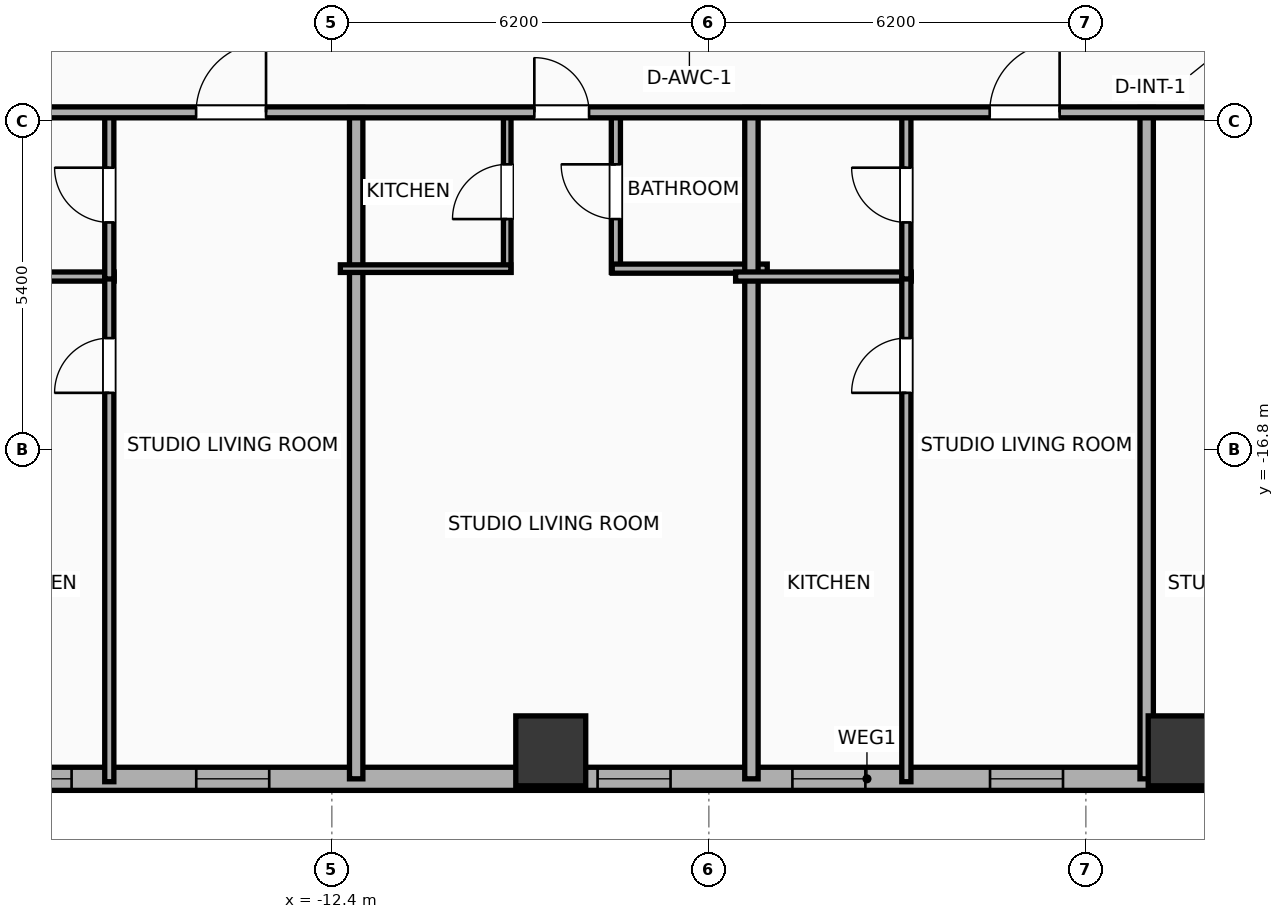
"""IFC4 building model, lengths in metres.
Left out: names, types, materials, properties, quantities, classifications, styles, units other than length and angle.
Written with IfcOpenShell. Run it as: python <this file> out.ifc"""

import sys

from ifc_helpers import new_model, si_unit, direction, frame, frame_2d, origin, origin_2d, place, context, subcontext, project, spatial, rectangle, hollow_rectangle, extrude, element, fill, save


model = new_model("IFC4")
c1 = context("Model", 3, precision=1e-05, world=origin(), true_north=direction((0.0, 1.0)))
c2 = subcontext(c1, "Body", "Model", "MODEL_VIEW")
j1 = project(units=[si_unit("LENGTHUNIT", "METRE"), si_unit("PLANEANGLEUNIT", "RADIAN")], contexts=[c1])
p1 = place(None, origin())
s1 = spatial("IfcSite", under=j1, at=p1, CompositionType="ELEMENT")
p2 = place(p1, origin())
s2 = spatial("IfcBuilding", under=s1, at=p2, CompositionType="ELEMENT")
p3 = place(p2, frame((0.0, 0.0, 76.7)))
s3 = spatial("IfcBuildingStorey", under=s2, at=p3, CompositionType="ELEMENT", Elevation=76.7)
for number, where, z_axis, x_axis in (
    (1, (-8.8, -21.75, 0.0), (0.0, 0.0, 1.0), (1.0, 0.0, 0.0)),
    (2, (1.6, -21.75, 0.0), (0.0, 0.0, 1.0), (1.0, 0.0, 0.0)),
):
    element("IfcColumn", number, at=place(p3, frame(where, z_axis=z_axis, x_axis=x_axis)), inside=s3, PredefinedType="COLUMN", context=c2, shape_type="SweptSolid", body=[
        extrude(hollow_rectangle(XDim=1.15, YDim=1.15, WallThickness=0.04, at=origin_2d()), origin(), (0.0, 0.0, 1.0), 3.9),
    ])
p4 = place(p3, frame((22.381, -22.21, 0.0), z_axis=(0.0, 0.0, 1.0), x_axis=(-1.0, 0.0, 0.0)))
e3 = element("IfcWall", 3, at=p4, inside=s3, PredefinedType="ELEMENTEDWALL", context=c2, shape_type="SweptSolid", body=[
    extrude(rectangle(XDim=51.963, YDim=0.38, at=frame_2d((25.981, 0.0))), origin(), (0.0, 0.0, 1.0), 3.6),
])
p5 = place(p4, frame((5.81, 0.0, 0.75)))
e4 = element("IfcOpeningElement", 4, at=p5, cuts=e3, PredefinedType="OPENING", context=c2, shape_type="SweptSolid", body=[
    extrude(rectangle(XDim=2.4, YDim=2.1, at=frame_2d((1.2, 1.05))), frame((0.0, 0.2, 0.0), z_axis=(0.0, -1.0, 0.0), x_axis=(1.0, 0.0, 0.0)), (0.0, 0.0, 1.0), 0.4),
])
p6 = place(p4, frame((49.106, 0.0, 0.75)))
e5 = element("IfcOpeningElement", 5, at=p6, cuts=e3, PredefinedType="OPENING", context=c2, shape_type="SweptSolid", body=[
    extrude(rectangle(XDim=1.2, YDim=2.05, at=frame_2d((0.6, 1.025))), frame((0.0, 0.2, 0.0), z_axis=(0.0, -1.0, 0.0), x_axis=(1.0, 0.0, 0.0)), (0.0, 0.0, 1.0), 0.4),
])
p7 = place(p4, frame((45.716, 0.0, 0.75)))
e6 = element("IfcOpeningElement", 6, at=p7, cuts=e3, PredefinedType="OPENING", context=c2, shape_type="SweptSolid", body=[
    extrude(rectangle(XDim=1.2, YDim=2.05, at=frame_2d((0.6, 1.025))), frame((0.0, 0.2, 0.0), z_axis=(0.0, -1.0, 0.0), x_axis=(1.0, 0.0, 0.0)), (0.0, 0.0, 1.0), 0.4),
])
p8 = place(p4, frame((42.346, 0.0, 0.75)))
e7 = element("IfcOpeningElement", 7, at=p8, cuts=e3, PredefinedType="OPENING", context=c2, shape_type="SweptSolid", body=[
    extrude(rectangle(XDim=1.2, YDim=2.05, at=frame_2d((0.6, 1.025))), frame((0.0, 0.2, 0.0), z_axis=(0.0, -1.0, 0.0), x_axis=(1.0, 0.0, 0.0)), (0.0, 0.0, 1.0), 0.4),
])
p9 = place(p4, frame((35.811, 0.0, 0.75)))
e8 = element("IfcOpeningElement", 8, at=p9, cuts=e3, PredefinedType="OPENING", context=c2, shape_type="SweptSolid", body=[
    extrude(rectangle(XDim=1.2, YDim=2.05, at=frame_2d((0.6, 1.025))), frame((0.0, 0.2, 0.0), z_axis=(0.0, -1.0, 0.0), x_axis=(1.0, 0.0, 0.0)), (0.0, 0.0, 1.0), 0.4),
])
p10 = place(p4, frame((39.061, 0.0, 0.75)))
e9 = element("IfcOpeningElement", 9, at=p10, cuts=e3, PredefinedType="OPENING", context=c2, shape_type="SweptSolid", body=[
    extrude(rectangle(XDim=1.2, YDim=2.05, at=frame_2d((0.6, 1.025))), frame((0.0, 0.2, 0.0), z_axis=(0.0, -1.0, 0.0), x_axis=(1.0, 0.0, 0.0)), (0.0, 0.0, 1.0), 0.4),
])
p11 = place(p4, frame((29.211, 0.0, 0.75)))
e10 = element("IfcOpeningElement", 10, at=p11, cuts=e3, PredefinedType="OPENING", context=c2, shape_type="SweptSolid", body=[
    extrude(rectangle(XDim=1.2, YDim=2.05, at=frame_2d((0.6, 1.025))), frame((0.0, 0.2, 0.0), z_axis=(0.0, -1.0, 0.0), x_axis=(1.0, 0.0, 0.0)), (0.0, 0.0, 1.0), 0.4),
])
p12 = place(p4, frame((22.757, 0.0, 0.75)))
e11 = element("IfcOpeningElement", 11, at=p12, cuts=e3, PredefinedType="OPENING", context=c2, shape_type="SweptSolid", body=[
    extrude(rectangle(XDim=1.2, YDim=2.05, at=frame_2d((0.6, 1.025))), frame((0.0, 0.2, 0.0), z_axis=(0.0, -1.0, 0.0), x_axis=(1.0, 0.0, 0.0)), (0.0, 0.0, 1.0), 0.4),
])
p13 = place(p4, frame((26.007, 0.0, 0.75)))
e12 = element("IfcOpeningElement", 12, at=p13, cuts=e3, PredefinedType="OPENING", context=c2, shape_type="SweptSolid", body=[
    extrude(rectangle(XDim=1.2, YDim=2.05, at=frame_2d((0.6, 1.025))), frame((0.0, 0.2, 0.0), z_axis=(0.0, -1.0, 0.0), x_axis=(1.0, 0.0, 0.0)), (0.0, 0.0, 1.0), 0.4),
])
p14 = place(p4, frame((18.697, 0.0, 0.75)))
e13 = element("IfcOpeningElement", 13, at=p14, cuts=e3, PredefinedType="OPENING", context=c2, shape_type="SweptSolid", body=[
    extrude(rectangle(XDim=1.2, YDim=2.05, at=frame_2d((0.6, 1.025))), frame((0.0, 0.2, 0.0), z_axis=(0.0, -1.0, 0.0), x_axis=(1.0, 0.0, 0.0)), (0.0, 0.0, 1.0), 0.4),
])
p15 = place(p4, frame((15.447, 0.0, 0.75)))
e14 = element("IfcOpeningElement", 14, at=p15, cuts=e3, PredefinedType="OPENING", context=c2, shape_type="SweptSolid", body=[
    extrude(rectangle(XDim=1.2, YDim=2.05, at=frame_2d((0.6, 1.025))), frame((0.0, 0.2, 0.0), z_axis=(0.0, -1.0, 0.0), x_axis=(1.0, 0.0, 0.0)), (0.0, 0.0, 1.0), 0.4),
])
p16 = place(p4, frame((11.162, 0.0, 0.75)))
e15 = element("IfcOpeningElement", 15, at=p16, cuts=e3, PredefinedType="OPENING", context=c2, shape_type="SweptSolid", body=[
    extrude(rectangle(XDim=1.2, YDim=2.05, at=frame_2d((0.6, 1.025))), frame((0.0, 0.2, 0.0), z_axis=(0.0, -1.0, 0.0), x_axis=(1.0, 0.0, 0.0)), (0.0, 0.0, 1.0), 0.4),
])
p17 = place(p4, frame((2.974, 0.0, 0.75)))
e16 = element("IfcOpeningElement", 16, at=p17, cuts=e3, PredefinedType="OPENING", context=c2, shape_type="SweptSolid", body=[
    extrude(rectangle(XDim=1.2, YDim=2.05, at=frame_2d((0.6, 1.025))), frame((0.0, 0.2, 0.0), z_axis=(0.0, -1.0, 0.0), x_axis=(1.0, 0.0, 0.0)), (0.0, 0.0, 1.0), 0.4),
])
p18 = place(p4, frame((0.927, 0.0, 0.75)))
e17 = element("IfcOpeningElement", 17, at=p18, cuts=e3, PredefinedType="OPENING", context=c2, shape_type="SweptSolid", body=[
    extrude(rectangle(XDim=1.2, YDim=2.05, at=frame_2d((0.6, 1.025))), frame((0.0, 0.2, 0.0), z_axis=(0.0, -1.0, 0.0), x_axis=(1.0, 0.0, 0.0)), (0.0, 0.0, 1.0), 0.4),
])
p19 = place(p3, frame((-18.76, -13.95, 0.0), z_axis=(0.0, 0.0, 1.0), x_axis=(1.0, 0.0, 0.0)))
e18 = element("IfcWall", 18, at=p19, inside=s3, PredefinedType="PLUMBINGWALL", context=c2, shape_type="SweptSolid", body=[
    extrude(rectangle(XDim=2.78, YDim=0.15, at=frame_2d((1.39, 0.0))), origin(), (0.0, 0.0, 1.0), 3.6),
])
p20 = place(p3, frame((-16.06, -22.258, 0.0), z_axis=(0.0, 0.0, 1.0), x_axis=(0.0, 1.0, 0.0)))
e19 = element("IfcWall", 19, at=p20, inside=s3, PredefinedType="PLUMBINGWALL", context=c2, shape_type="SweptSolid", body=[
    extrude(rectangle(XDim=8.348, YDim=0.15, at=frame_2d((4.174, 0.0))), origin(), (0.0, 0.0, 1.0), 3.6),
])
p21 = place(p20, frame((6.395, 0.0, 0.0)))
e20 = element("IfcOpeningElement", 20, at=p21, cuts=e19, PredefinedType="OPENING", context=c2, shape_type="SweptSolid", body=[
    extrude(rectangle(XDim=0.9, YDim=2.05, at=frame_2d((0.45, 1.025))), frame((0.0, 0.085, 0.0), z_axis=(0.0, -1.0, 0.0), x_axis=(1.0, 0.0, 0.0)), (0.0, 0.0, 1.0), 0.17),
])
p22 = place(p3, frame((-16.06, -13.99, 0.0), z_axis=(0.0, 0.0, 1.0), x_axis=(0.0, 1.0, 0.0)))
e21 = element("IfcWall", 21, at=p22, inside=s3, PredefinedType="PLUMBINGWALL", context=c2, shape_type="SweptSolid", body=[
    extrude(rectangle(XDim=2.76, YDim=0.15, at=frame_2d((1.38, 0.0))), origin(), (0.0, 0.0, 1.0), 3.6),
])
p23 = place(p22, frame((0.93, 0.0, 0.0)))
e22 = element("IfcOpeningElement", 22, at=p23, cuts=e21, PredefinedType="OPENING", context=c2, shape_type="SweptSolid", body=[
    extrude(rectangle(XDim=0.9, YDim=2.05, at=frame_2d((0.45, 1.025))), frame((0.0, 0.085, 0.0), z_axis=(0.0, -1.0, 0.0), x_axis=(1.0, 0.0, 0.0)), (0.0, 0.0, 1.0), 0.17),
])
p24 = place(p3, frame((-12.0, -22.21, 0.0), z_axis=(0.0, 0.0, 1.0), x_axis=(0.0, 1.0, 0.0)))
e23 = element("IfcWall", 23, at=p24, inside=s3, PredefinedType="PARTITIONING", context=c2, shape_type="SweptSolid", body=[
    extrude(rectangle(XDim=11.04, YDim=0.22, at=frame_2d((5.52, 0.0))), origin(), (0.0, 0.0, 1.0), 3.6),
])
p25 = place(p3, frame((-9.516, -13.88, 0.0), z_axis=(0.0, 0.0, 1.0), x_axis=(0.0, 1.0, 0.0)))
e24 = element("IfcWall", 24, at=p25, inside=s3, PredefinedType="PARTITIONING", context=c2, shape_type="SweptSolid", body=[
    extrude(rectangle(XDim=2.65, YDim=0.125, at=frame_2d((1.325, 0.0))), origin(), (0.0, 0.0, 1.0), 3.6),
])
p26 = place(p25, frame((0.875, 0.0, 0.0)))
e25 = element("IfcOpeningElement", 25, at=p26, cuts=e24, PredefinedType="OPENING", context=c2, shape_type="SweptSolid", body=[
    extrude(rectangle(XDim=0.9, YDim=2.05, at=frame_2d((0.45, 1.025))), frame((0.0, 0.073, 0.0), z_axis=(0.0, -1.0, 0.0), x_axis=(1.0, 0.0, 0.0)), (0.0, 0.0, 1.0), 0.145),
])
p27 = place(p3, frame((-7.729, -13.88, 0.0), z_axis=(0.0, 0.0, 1.0), x_axis=(0.0, 1.0, 0.0)))
e26 = element("IfcWall", 26, at=p27, inside=s3, PredefinedType="PLUMBINGWALL", context=c2, shape_type="SweptSolid", body=[
    extrude(rectangle(XDim=2.65, YDim=0.15, at=frame_2d((1.325, 0.0))), origin(), (0.0, 0.0, 1.0), 3.6),
])
p28 = place(p27, frame((0.875, 0.0, 0.0)))
e27 = element("IfcOpeningElement", 27, at=p28, cuts=e26, PredefinedType="OPENING", context=c2, shape_type="SweptSolid", body=[
    extrude(rectangle(XDim=0.9, YDim=2.05, at=frame_2d((0.45, 1.025))), frame((0.0, 0.085, 0.0), z_axis=(0.0, -1.0, 0.0), x_axis=(1.0, 0.0, 0.0)), (0.0, 0.0, 1.0), 0.17),
])
p29 = place(p3, frame((-12.26, -13.82, 0.0), z_axis=(0.0, 0.0, 1.0), x_axis=(1.0, 0.0, 0.0)))
e28 = element("IfcWall", 28, at=p29, inside=s3, PredefinedType="PARTITIONING", context=c2, shape_type="SweptSolid", body=[
    extrude(rectangle(XDim=2.804, YDim=0.125, at=frame_2d((1.402, 0.0))), origin(), (0.0, 0.0, 1.0), 3.6),
])
p30 = place(p3, frame((-7.789, -13.82, 0.0), z_axis=(0.0, 0.0, 1.0), x_axis=(1.0, 0.0, 0.0)))
e29 = element("IfcWall", 29, at=p30, inside=s3, PredefinedType="PLUMBINGWALL", context=c2, shape_type="SweptSolid", body=[
    extrude(rectangle(XDim=2.549, YDim=0.15, at=frame_2d((1.274, 0.0))), origin(), (0.0, 0.0, 1.0), 3.6),
])
p31 = place(p3, frame((-5.5, -22.21, 0.0), z_axis=(0.0, 0.0, 1.0), x_axis=(0.0, 1.0, 0.0)))
e30 = element("IfcWall", 30, at=p31, inside=s3, PredefinedType="PARTITIONING", context=c2, shape_type="SweptSolid", body=[
    extrude(rectangle(XDim=11.04, YDim=0.22, at=frame_2d((5.52, 0.0))), origin(), (0.0, 0.0, 1.0), 3.6),
])
p32 = place(p3, frame((-5.76, -13.95, 0.0), z_axis=(0.0, 0.0, 1.0), x_axis=(1.0, 0.0, 0.0)))
e31 = element("IfcWall", 31, at=p32, inside=s3, PredefinedType="PLUMBINGWALL", context=c2, shape_type="SweptSolid", body=[
    extrude(rectangle(XDim=2.888, YDim=0.15, at=frame_2d((1.444, 0.0))), origin(), (0.0, 0.0, 1.0), 3.6),
])
p33 = place(p3, frame((-2.952, -22.258, 0.0), z_axis=(0.0, 0.0, 1.0), x_axis=(0.0, 1.0, 0.0)))
e32 = element("IfcWall", 32, at=p33, inside=s3, PredefinedType="PLUMBINGWALL", context=c2, shape_type="SweptSolid", body=[
    extrude(rectangle(XDim=8.348, YDim=0.15, at=frame_2d((4.174, 0.0))), origin(), (0.0, 0.0, 1.0), 3.6),
])
p34 = place(p33, frame((6.395, 0.0, 0.0)))
e33 = element("IfcOpeningElement", 33, at=p34, cuts=e32, PredefinedType="OPENING", context=c2, shape_type="SweptSolid", body=[
    extrude(rectangle(XDim=0.9, YDim=2.05, at=frame_2d((0.45, 1.025))), frame((0.0, 0.085, 0.0), z_axis=(0.0, -1.0, 0.0), x_axis=(1.0, 0.0, 0.0)), (0.0, 0.0, 1.0), 0.17),
])
p35 = place(p3, frame((-2.952, -13.99, 0.0), z_axis=(0.0, 0.0, 1.0), x_axis=(0.0, 1.0, 0.0)))
e34 = element("IfcWall", 34, at=p35, inside=s3, PredefinedType="PLUMBINGWALL", context=c2, shape_type="SweptSolid", body=[
    extrude(rectangle(XDim=2.76, YDim=0.15, at=frame_2d((1.38, 0.0))), origin(), (0.0, 0.0, 1.0), 3.6),
])
p36 = place(p35, frame((0.93, 0.0, 0.0)))
e35 = element("IfcOpeningElement", 35, at=p36, cuts=e34, PredefinedType="OPENING", context=c2, shape_type="SweptSolid", body=[
    extrude(rectangle(XDim=0.9, YDim=2.05, at=frame_2d((0.45, 1.025))), frame((0.0, 0.085, 0.0), z_axis=(0.0, -1.0, 0.0), x_axis=(1.0, 0.0, 0.0)), (0.0, 0.0, 1.0), 0.17),
])
p37 = place(p3, frame((1.0, -22.21, 0.0), z_axis=(0.0, 0.0, 1.0), x_axis=(0.0, 1.0, 0.0)))
e36 = element("IfcWall", 36, at=p37, inside=s3, PredefinedType="PARTITIONING", context=c2, shape_type="SweptSolid", body=[
    extrude(rectangle(XDim=11.04, YDim=0.22, at=frame_2d((5.52, 0.0))), origin(), (0.0, 0.0, 1.0), 3.6),
])
p38 = place(p3, frame((-33.41, -11.25, 0.0), z_axis=(0.0, 0.0, 1.0), x_axis=(1.0, 0.0, 0.0)))
e37 = element("IfcWall", 37, at=p38, inside=s3, PredefinedType="PARTITIONING", context=c2, shape_type="SweptSolid", body=[
    extrude(rectangle(XDim=59.62, YDim=0.18, at=frame_2d((29.81, 0.0))), origin(), (0.0, 0.0, 1.0), 3.6),
])
p39 = place(p38, frame((3.282, 0.0, 0.0)))
e38 = element("IfcOpeningElement", 38, at=p39, cuts=e37, PredefinedType="OPENING", context=c2, shape_type="SweptSolid", body=[
    extrude(rectangle(XDim=1.15, YDim=2.05, at=frame_2d((0.575, 1.025))), frame((0.0, 0.1, 0.0), z_axis=(0.0, -1.0, 0.0), x_axis=(1.0, 0.0, 0.0)), (0.0, 0.0, 1.0), 0.2),
])
p40 = place(p38, frame((10.771, 0.0, 0.0)))
e39 = element("IfcOpeningElement", 39, at=p40, cuts=e37, PredefinedType="OPENING", context=c2, shape_type="SweptSolid", body=[
    extrude(rectangle(XDim=1.15, YDim=2.05, at=frame_2d((0.575, 1.025))), frame((0.0, 0.1, 0.0), z_axis=(0.0, -1.0, 0.0), x_axis=(1.0, 0.0, 0.0)), (0.0, 0.0, 1.0), 0.2),
])
p41 = place(p38, frame((18.778, 0.0, 0.0)))
e40 = element("IfcOpeningElement", 40, at=p41, cuts=e37, PredefinedType="OPENING", context=c2, shape_type="SweptSolid", body=[
    extrude(rectangle(XDim=1.15, YDim=2.05, at=frame_2d((0.575, 1.025))), frame((0.0, 0.1, 0.0), z_axis=(0.0, -1.0, 0.0), x_axis=(1.0, 0.0, 0.0)), (0.0, 0.0, 1.0), 0.2),
])
p42 = place(p38, frame((24.34, 0.0, 0.0)))
e41 = element("IfcOpeningElement", 41, at=p42, cuts=e37, PredefinedType="OPENING", context=c2, shape_type="SweptSolid", body=[
    extrude(rectangle(XDim=0.9, YDim=2.05, at=frame_2d((0.45, 1.025))), frame((0.0, 0.1, 0.0), z_axis=(0.0, -1.0, 0.0), x_axis=(1.0, 0.0, 0.0)), (0.0, 0.0, 1.0), 0.2),
])
p43 = place(p38, frame((31.829, 0.0, 0.0)))
e42 = element("IfcOpeningElement", 42, at=p43, cuts=e37, PredefinedType="OPENING", context=c2, shape_type="SweptSolid", body=[
    extrude(rectangle(XDim=1.15, YDim=2.05, at=frame_2d((0.575, 1.025))), frame((0.0, 0.1, 0.0), z_axis=(0.0, -1.0, 0.0), x_axis=(1.0, 0.0, 0.0)), (0.0, 0.0, 1.0), 0.2),
])
p44 = place(p38, frame((35.948, 0.0, 0.0)))
e43 = element("IfcOpeningElement", 43, at=p44, cuts=e37, PredefinedType="OPENING", context=c2, shape_type="SweptSolid", body=[
    extrude(rectangle(XDim=1.15, YDim=2.05, at=frame_2d((0.575, 1.025))), frame((0.0, 0.1, 0.0), z_axis=(0.0, -1.0, 0.0), x_axis=(1.0, 0.0, 0.0)), (0.0, 0.0, 1.0), 0.2),
])
p45 = place(p38, frame((43.705, 0.0, 0.0)))
e44 = element("IfcOpeningElement", 44, at=p45, cuts=e37, PredefinedType="OPENING", context=c2, shape_type="SweptSolid", body=[
    extrude(rectangle(XDim=0.9, YDim=2.05, at=frame_2d((0.45, 1.025))), frame((0.0, 0.1, 0.0), z_axis=(0.0, -1.0, 0.0), x_axis=(1.0, 0.0, 0.0)), (0.0, 0.0, 1.0), 0.2),
])
p46 = place(p38, frame((48.552, 0.0, 0.0)))
e45 = element("IfcOpeningElement", 45, at=p46, cuts=e37, PredefinedType="OPENING", context=c2, shape_type="SweptSolid", body=[
    extrude(rectangle(XDim=1.15, YDim=2.05, at=frame_2d((0.575, 1.025))), frame((0.0, 0.1, 0.0), z_axis=(0.0, -1.0, 0.0), x_axis=(1.0, 0.0, 0.0)), (0.0, 0.0, 1.0), 0.2),
])
p47 = place(p38, frame((56.213, 0.0, 0.0)))
e46 = element("IfcOpeningElement", 46, at=p47, cuts=e37, PredefinedType="OPENING", context=c2, shape_type="SweptSolid", body=[
    extrude(rectangle(XDim=0.9, YDim=2.05, at=frame_2d((0.45, 1.025))), frame((0.0, 0.1, 0.0), z_axis=(0.0, -1.0, 0.0), x_axis=(1.0, 0.0, 0.0)), (0.0, 0.0, 1.0), 0.2),
])
p48 = place(p9, origin())
e47 = element("IfcWindow", 47, at=p48, inside=s3, PartitioningType="SINGLE_PANEL", PredefinedType="WINDOW", context=c2, shape_type="SweptSolid", body=[
    extrude(rectangle(XDim=1.2, YDim=2.05, at=frame_2d((0.6, 1.025))), frame((0.0, 0.03, 0.0), z_axis=(0.0, -1.0, 0.0), x_axis=(1.0, 0.0, 0.0)), (0.0, 0.0, 1.0), 0.06),
])
fill(e8, e47)
p49 = place(p10, origin())
e48 = element("IfcWindow", 48, at=p49, inside=s3, PartitioningType="SINGLE_PANEL", PredefinedType="WINDOW", context=c2, shape_type="SweptSolid", body=[
    extrude(rectangle(XDim=1.2, YDim=2.05, at=frame_2d((0.6, 1.025))), frame((0.0, 0.03, 0.0), z_axis=(0.0, -1.0, 0.0), x_axis=(1.0, 0.0, 0.0)), (0.0, 0.0, 1.0), 0.06),
])
fill(e9, e48)
p50 = place(p11, origin())
e49 = element("IfcWindow", 49, at=p50, inside=s3, PartitioningType="SINGLE_PANEL", PredefinedType="WINDOW", context=c2, shape_type="SweptSolid", body=[
    extrude(rectangle(XDim=1.2, YDim=2.05, at=frame_2d((0.6, 1.025))), frame((0.0, 0.03, 0.0), z_axis=(0.0, -1.0, 0.0), x_axis=(1.0, 0.0, 0.0)), (0.0, 0.0, 1.0), 0.06),
])
fill(e10, e49)
p51 = place(p12, origin())
e50 = element("IfcWindow", 50, at=p51, inside=s3, PartitioningType="SINGLE_PANEL", PredefinedType="WINDOW", context=c2, shape_type="SweptSolid", body=[
    extrude(rectangle(XDim=1.2, YDim=2.05, at=frame_2d((0.6, 1.025))), frame((0.0, 0.03, 0.0), z_axis=(0.0, -1.0, 0.0), x_axis=(1.0, 0.0, 0.0)), (0.0, 0.0, 1.0), 0.06),
])
fill(e11, e50)
p52 = place(p13, origin())
e51 = element("IfcWindow", 51, at=p52, inside=s3, PartitioningType="SINGLE_PANEL", PredefinedType="WINDOW", context=c2, shape_type="SweptSolid", body=[
    extrude(rectangle(XDim=1.2, YDim=2.05, at=frame_2d((0.6, 1.025))), frame((0.0, 0.03, 0.0), z_axis=(0.0, -1.0, 0.0), x_axis=(1.0, 0.0, 0.0)), (0.0, 0.0, 1.0), 0.06),
])
fill(e12, e51)
p53 = place(p21, origin())
e52 = element("IfcDoor", 52, at=p53, inside=s3, OperationType="SINGLE_SWING_LEFT", PredefinedType="DOOR", context=c2, shape_type="SweptSolid", body=[
    extrude(rectangle(XDim=0.9, YDim=2.05, at=frame_2d((0.45, 1.025))), frame((0.0, 0.025, 0.0), z_axis=(0.0, -1.0, 0.0), x_axis=(1.0, 0.0, 0.0)), (0.0, 0.0, 1.0), 0.05),
])
fill(e20, e52)
p54 = place(p23, origin())
e53 = element("IfcDoor", 53, at=p54, inside=s3, OperationType="SINGLE_SWING_RIGHT", PredefinedType="DOOR", context=c2, shape_type="SweptSolid", body=[
    extrude(rectangle(XDim=0.9, YDim=2.05, at=frame_2d((0.45, 1.025))), frame((0.0, 0.025, 0.0), z_axis=(0.0, -1.0, 0.0), x_axis=(1.0, 0.0, 0.0)), (0.0, 0.0, 1.0), 0.05),
])
fill(e22, e53)
p55 = place(p26, origin())
e54 = element("IfcDoor", 54, at=p55, inside=s3, OperationType="SINGLE_SWING_LEFT", PredefinedType="DOOR", context=c2, shape_type="SweptSolid", body=[
    extrude(rectangle(XDim=0.9, YDim=2.05, at=frame_2d((0.45, 1.025))), frame((0.0, 0.025, 0.0), z_axis=(0.0, -1.0, 0.0), x_axis=(1.0, 0.0, 0.0)), (0.0, 0.0, 1.0), 0.05),
])
fill(e25, e54)
p56 = place(p28, origin())
e55 = element("IfcDoor", 55, at=p56, inside=s3, OperationType="SINGLE_SWING_RIGHT", PredefinedType="DOOR", context=c2, shape_type="SweptSolid", body=[
    extrude(rectangle(XDim=0.9, YDim=2.05, at=frame_2d((0.45, 1.025))), frame((0.0, 0.025, 0.0), z_axis=(0.0, -1.0, 0.0), x_axis=(1.0, 0.0, 0.0)), (0.0, 0.0, 1.0), 0.05),
])
fill(e27, e55)
p57 = place(p34, origin())
e56 = element("IfcDoor", 56, at=p57, inside=s3, OperationType="SINGLE_SWING_LEFT", PredefinedType="DOOR", context=c2, shape_type="SweptSolid", body=[
    extrude(rectangle(XDim=0.9, YDim=2.05, at=frame_2d((0.45, 1.025))), frame((0.0, 0.025, 0.0), z_axis=(0.0, -1.0, 0.0), x_axis=(1.0, 0.0, 0.0)), (0.0, 0.0, 1.0), 0.05),
])
fill(e33, e56)
p58 = place(p36, origin())
e57 = element("IfcDoor", 57, at=p58, inside=s3, OperationType="SINGLE_SWING_RIGHT", PredefinedType="DOOR", context=c2, shape_type="SweptSolid", body=[
    extrude(rectangle(XDim=0.9, YDim=2.05, at=frame_2d((0.45, 1.025))), frame((0.0, 0.025, 0.0), z_axis=(0.0, -1.0, 0.0), x_axis=(1.0, 0.0, 0.0)), (0.0, 0.0, 1.0), 0.05),
])
fill(e35, e57)
p59 = place(p41, origin())
e58 = element("IfcDoor", 58, at=p59, inside=s3, OperationType="SINGLE_SWING_RIGHT", PredefinedType="DOOR", context=c2, shape_type="SweptSolid", body=[
    extrude(rectangle(XDim=1.15, YDim=2.05, at=frame_2d((0.575, 1.025))), frame((0.0, 0.025, 0.0), z_axis=(0.0, -1.0, 0.0), x_axis=(1.0, 0.0, 0.0)), (0.0, 0.0, 1.0), 0.05),
])
fill(e40, e58)
p60 = place(p42, origin())
e59 = element("IfcDoor", 59, at=p60, inside=s3, OperationType="SINGLE_SWING_LEFT", PredefinedType="DOOR", context=c2, shape_type="SweptSolid", body=[
    extrude(rectangle(XDim=0.9, YDim=2.05, at=frame_2d((0.45, 1.025))), frame((0.0, 0.025, 0.0), z_axis=(0.0, -1.0, 0.0), x_axis=(1.0, 0.0, 0.0)), (0.0, 0.0, 1.0), 0.05),
])
fill(e41, e59)
p61 = place(p43, origin())
e60 = element("IfcDoor", 60, at=p61, inside=s3, OperationType="SINGLE_SWING_RIGHT", PredefinedType="DOOR", context=c2, shape_type="SweptSolid", body=[
    extrude(rectangle(XDim=1.15, YDim=2.05, at=frame_2d((0.575, 1.025))), frame((0.0, 0.025, 0.0), z_axis=(0.0, -1.0, 0.0), x_axis=(1.0, 0.0, 0.0)), (0.0, 0.0, 1.0), 0.05),
])
fill(e42, e60)
save(model, sys.argv[1])
